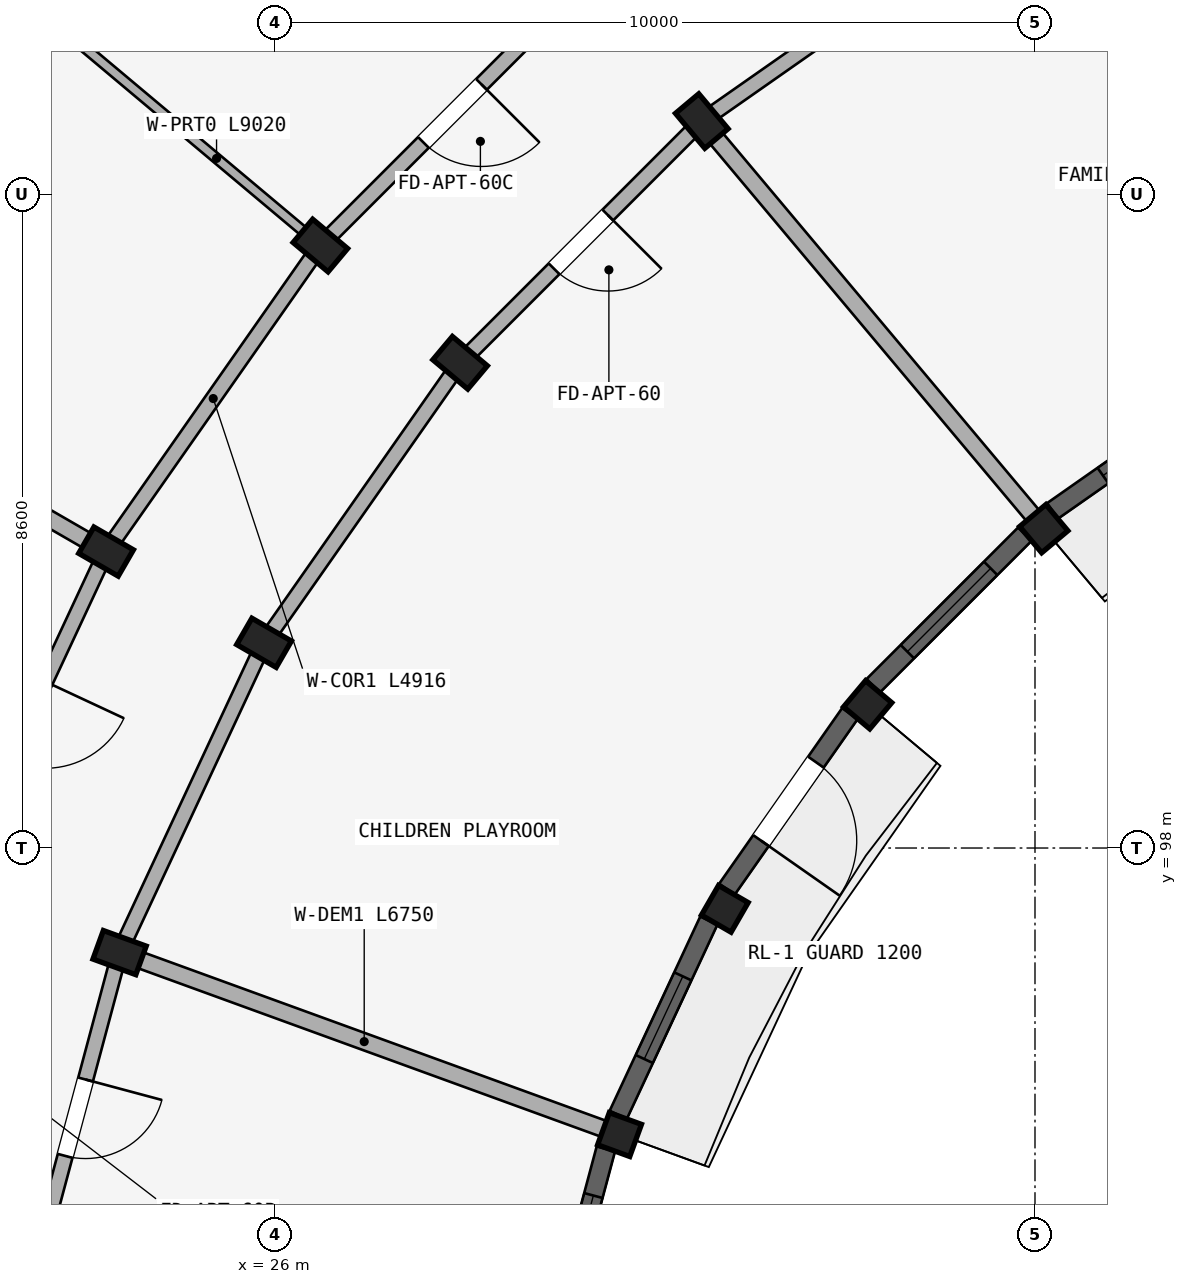
"""IFC4 building model, lengths in metres.
Left out: names, types, materials, properties, quantities, classifications, styles, units other than length and angle.
Written with IfcOpenShell. Run it as: python <this file> out.ifc"""

import sys

from ifc_helpers import new_model, si_unit, direction, frame, frame_2d, origin, origin_2d, place, context, subcontext, project, spatial, rectangle, extrude, element, fill, save


model = new_model("IFC4")
c1 = context("Model", 3, precision=1e-05, world=origin(), true_north=direction((0.0, 1.0)))
c2 = subcontext(c1, "Body", "Model", "MODEL_VIEW")
j1 = project(units=[si_unit("LENGTHUNIT", "METRE"), si_unit("PLANEANGLEUNIT", "RADIAN")], contexts=[c1])
p1 = place(None, origin())
s1 = spatial("IfcSite", under=j1, at=p1, CompositionType="ELEMENT")
p2 = place(p1, origin())
s2 = spatial("IfcBuilding", under=s1, at=p2, CompositionType="ELEMENT")
p3 = place(p2, frame((0.0, 0.0, 46.5)))
s3 = spatial("IfcBuildingStorey", under=s2, at=p3, CompositionType="ELEMENT", Elevation=46.5)
p4 = place(p3, frame((36.115, 102.202, 0.0), z_axis=(0.0, 0.0, 1.0), x_axis=(0.766044443119, 0.642787609687, 0.0)))
e1 = element("IfcColumn", 1, at=p4, inside=s3, PredefinedType="COLUMN", context=c2, shape_type="SweptSolid", body=[
    extrude(rectangle(XDim=0.45, YDim=0.45, at=origin_2d()), origin(), (0.0, 0.0, 1.0), 2.93),
])
p5 = place(p3, frame((31.616, 107.564, 0.0), z_axis=(0.0, 0.0, 1.0), x_axis=(0.766044443119, 0.642787609687, 0.0)))
e2 = element("IfcColumn", 2, at=p5, inside=s3, PredefinedType="COLUMN", context=c2, shape_type="SweptSolid", body=[
    extrude(rectangle(XDim=0.4, YDim=0.6, at=origin_2d()), origin(), (0.0, 0.0, 1.0), 2.93),
])
p6 = place(p3, frame((33.798, 99.885, 0.0), z_axis=(0.0, 0.0, 1.0), x_axis=(0.642787609687, 0.766044443119, 0.0)))
e3 = element("IfcColumn", 3, at=p6, inside=s3, PredefinedType="COLUMN", context=c2, shape_type="SweptSolid", body=[
    extrude(rectangle(XDim=0.45, YDim=0.45, at=origin_2d()), origin(), (0.0, 0.0, 1.0), 2.93),
])
for number, where, z_axis, x_axis in (
    (4, (28.436, 104.384, 0.0), (0.0, 0.0, 1.0), (0.643, 0.766, 0.0)),
    (5, (26.598, 105.927, 0.0), (0.0, 0.0, 1.0), (0.643, 0.766, 0.0)),
):
    element("IfcColumn", number, at=place(p3, frame(where, z_axis=z_axis, x_axis=x_axis)), inside=s3, PredefinedType="COLUMN", context=c2, shape_type="SweptSolid", body=[
        extrude(rectangle(XDim=0.4, YDim=0.6, at=origin_2d()), origin(), (0.0, 0.0, 1.0), 2.93),
    ])
p7 = place(p3, frame((31.919, 97.2, 0.0), z_axis=(0.0, 0.0, 1.0), x_axis=(0.5, 0.866025403784, 0.0)))
e6 = element("IfcColumn", 6, at=p7, inside=s3, PredefinedType="COLUMN", context=c2, shape_type="SweptSolid", body=[
    extrude(rectangle(XDim=0.45, YDim=0.45, at=origin_2d()), origin(), (0.0, 0.0, 1.0), 2.93),
])
for number, where, z_axis, x_axis in (
    (7, (25.856, 100.7, 0.0), (0.0, 0.0, 1.0), (0.5, 0.866, 0.0)),
    (8, (23.778, 101.9, 0.0), (0.0, 0.0, 1.0), (0.5, 0.866, 0.0)),
):
    element("IfcColumn", number, at=place(p3, frame(where, z_axis=z_axis, x_axis=x_axis)), inside=s3, PredefinedType="COLUMN", context=c2, shape_type="SweptSolid", body=[
        extrude(rectangle(XDim=0.4, YDim=0.6, at=origin_2d()), origin(), (0.0, 0.0, 1.0), 2.93),
    ])
p8 = place(p3, frame((30.534, 94.23, 0.0), z_axis=(0.0, 0.0, 1.0), x_axis=(0.342020143326, 0.939692620786, 0.0)))
e9 = element("IfcColumn", 9, at=p8, inside=s3, PredefinedType="COLUMN", context=c2, shape_type="SweptSolid", body=[
    extrude(rectangle(XDim=0.45, YDim=0.45, at=origin_2d()), origin(), (0.0, 0.0, 1.0), 2.93),
])
p9 = place(p3, frame((23.956, 96.624, 0.0), z_axis=(0.0, 0.0, 1.0), x_axis=(0.342020143326, 0.939692620786, 0.0)))
e10 = element("IfcColumn", 10, at=p9, inside=s3, PredefinedType="COLUMN", context=c2, shape_type="SweptSolid", body=[
    extrude(rectangle(XDim=0.4, YDim=0.6, at=origin_2d()), origin(), (0.0, 0.0, 1.0), 2.93),
])
p10 = place(p3, frame((35.3, 110.144, 0.0), z_axis=(0.0, 0.0, 1.0), x_axis=(-0.819155404658, -0.573571637217, 0.0)))
e11 = element("IfcWall", 11, at=p10, inside=s3, PredefinedType="STANDARD", context=c2, shape_type="SweptSolid", body=[
    extrude(rectangle(XDim=4.497, YDim=0.2, at=frame_2d((2.249, 0.0))), origin(), (0.0, 0.0, 1.0), 2.372),
])
p11 = place(p3, frame((31.616, 107.564, 0.0), z_axis=(0.0, 0.0, 1.0), x_axis=(-0.707106781187, -0.707106781187, 0.0)))
e12 = element("IfcWall", 12, at=p11, inside=s3, PredefinedType="STANDARD", context=c2, shape_type="SweptSolid", body=[
    extrude(rectangle(XDim=4.497, YDim=0.2, at=frame_2d((2.249, 0.0))), origin(), (0.0, 0.0, 1.0), 2.372),
])
p12 = place(p11, frame((1.749, 0.0, 0.0)))
e13 = element("IfcOpeningElement", 13, at=p12, cuts=e12, PredefinedType="OPENING", context=c2, shape_type="SweptSolid", body=[
    extrude(rectangle(XDim=1.0, YDim=2.15, at=frame_2d((0.5, 1.075))), frame((0.0, 0.11, 0.0), z_axis=(0.0, -1.0, 0.0), x_axis=(1.0, 0.0, 0.0)), (0.0, 0.0, 1.0), 0.22),
])
p13 = place(p3, frame((30.073, 109.402, 0.0), z_axis=(0.0, 0.0, 1.0), x_axis=(-0.707106781187, -0.707106781187, 0.0)))
e14 = element("IfcWall", 14, at=p13, inside=s3, PredefinedType="STANDARD", context=c2, shape_type="SweptSolid", body=[
    extrude(rectangle(XDim=4.916, YDim=0.2, at=frame_2d((2.458, 0.0))), origin(), (0.0, 0.0, 1.0), 2.372),
])
p14 = place(p13, frame((1.918, 0.0, 0.0)))
e15 = element("IfcOpeningElement", 15, at=p14, cuts=e14, PredefinedType="OPENING", context=c2, shape_type="SweptSolid", body=[
    extrude(rectangle(XDim=1.08, YDim=2.15, at=frame_2d((0.54, 1.075))), frame((0.0, 0.11, 0.0), z_axis=(0.0, -1.0, 0.0), x_axis=(1.0, 0.0, 0.0)), (0.0, 0.0, 1.0), 0.22),
])
p15 = place(p3, frame((28.436, 104.384, 0.0), z_axis=(0.0, 0.0, 1.0), x_axis=(-0.573571637217, -0.819155404658, 0.0)))
e16 = element("IfcWall", 16, at=p15, inside=s3, PredefinedType="STANDARD", context=c2, shape_type="SweptSolid", body=[
    extrude(rectangle(XDim=4.497, YDim=0.2, at=frame_2d((2.249, 0.0))), origin(), (0.0, 0.0, 1.0), 2.372),
])
p16 = place(p3, frame((26.598, 105.927, 0.0), z_axis=(0.0, 0.0, 1.0), x_axis=(-0.573592335331, -0.819140911474, 0.0)))
e17 = element("IfcWall", 17, at=p16, inside=s3, PredefinedType="STANDARD", context=c2, shape_type="SweptSolid", body=[
    extrude(rectangle(XDim=4.916, YDim=0.2, at=frame_2d((2.458, 0.0))), origin(), (0.0, 0.0, 1.0), 2.372),
])
p17 = place(p3, frame((25.856, 100.7, 0.0), z_axis=(0.0, 0.0, 1.0), x_axis=(-0.422617978463, -0.906307919131, 0.0)))
e18 = element("IfcWall", 18, at=p17, inside=s3, PredefinedType="STANDARD", context=c2, shape_type="SweptSolid", body=[
    extrude(rectangle(XDim=4.497, YDim=0.2, at=frame_2d((2.249, 0.0))), origin(), (0.0, 0.0, 1.0), 2.372),
])
p18 = place(p3, frame((23.778, 101.9, 0.0), z_axis=(0.0, 0.0, 1.0), x_axis=(-0.422629854778, -0.906302381024, 0.0)))
e19 = element("IfcWall", 19, at=p18, inside=s3, PredefinedType="STANDARD", context=c2, shape_type="SweptSolid", body=[
    extrude(rectangle(XDim=4.915, YDim=0.2, at=frame_2d((2.458, 0.0))), origin(), (0.0, 0.0, 1.0), 2.372),
])
p19 = place(p18, frame((1.888, 0.0, 0.0)))
e20 = element("IfcOpeningElement", 20, at=p19, cuts=e19, PredefinedType="OPENING", context=c2, shape_type="SweptSolid", body=[
    extrude(rectangle(XDim=1.14, YDim=2.15, at=frame_2d((0.57, 1.075))), frame((0.0, 0.11, 0.0), z_axis=(0.0, -1.0, 0.0), x_axis=(1.0, 0.0, 0.0)), (0.0, 0.0, 1.0), 0.22),
])
p20 = place(p3, frame((23.956, 96.624, 0.0), z_axis=(0.0, 0.0, 1.0), x_axis=(-0.258787642463, -0.965934240054, 0.0)))
e21 = element("IfcWall", 21, at=p20, inside=s3, PredefinedType="STANDARD", context=c2, shape_type="SweptSolid", body=[
    extrude(rectangle(XDim=4.497, YDim=0.2, at=frame_2d((2.249, 0.0))), origin(), (0.0, 0.0, 1.0), 2.372),
])
p21 = place(p20, frame((1.729, 0.0, 0.0)))
e22 = element("IfcOpeningElement", 22, at=p21, cuts=e21, PredefinedType="OPENING", context=c2, shape_type="SweptSolid", body=[
    extrude(rectangle(XDim=1.04, YDim=2.15, at=frame_2d((0.52, 1.075))), frame((0.0, 0.11, 0.0), z_axis=(0.0, -1.0, 0.0), x_axis=(1.0, 0.0, 0.0)), (0.0, 0.0, 1.0), 0.22),
])
p22 = place(p3, frame((35.987, 102.355, 0.0), z_axis=(0.0, 0.0, 1.0), x_axis=(-0.642784846501, 0.766046761698, 0.0)))
e23 = element("IfcWall", 23, at=p22, inside=s3, PredefinedType="STANDARD", context=c2, shape_type="SweptSolid", body=[
    extrude(rectangle(XDim=6.75, YDim=0.22, at=frame_2d((3.375, 0.0))), origin(), (0.0, 0.0, 1.0), 2.372),
])
p23 = place(p3, frame((26.521, 105.991, 0.0), z_axis=(0.0, 0.0, 1.0), x_axis=(-0.766047078847, 0.642784468535, 0.0)))
e24 = element("IfcWall", 24, at=p23, inside=s3, PredefinedType="PARTITIONING", context=c2, shape_type="SweptSolid", body=[
    extrude(rectangle(XDim=9.02, YDim=0.125, at=frame_2d((4.51, 0.0))), origin(), (0.0, 0.0, 1.0), 2.372),
])
p24 = place(p23, frame((4.45, 0.0, 0.0)))
e25 = element("IfcOpeningElement", 25, at=p24, cuts=e24, PredefinedType="OPENING", context=c2, shape_type="SweptSolid", body=[
    extrude(rectangle(XDim=0.8, YDim=2.1, at=frame_2d((0.4, 1.05))), frame((0.0, 0.073, 0.0), z_axis=(0.0, -1.0, 0.0), x_axis=(1.0, 0.0, 0.0)), (0.0, 0.0, 1.0), 0.145),
])
p25 = place(p3, frame((23.691, 101.95, 0.0), z_axis=(0.0, 0.0, 1.0), x_axis=(-0.866024222538, 0.500002045973, 0.0)))
e26 = element("IfcWall", 26, at=p25, inside=s3, PredefinedType="STANDARD", context=c2, shape_type="SweptSolid", body=[
    extrude(rectangle(XDim=9.02, YDim=0.22, at=frame_2d((4.51, 0.0))), origin(), (0.0, 0.0, 1.0), 2.372),
])
p26 = place(p3, frame((30.346, 94.298, 0.0), z_axis=(0.0, 0.0, 1.0), x_axis=(-0.939696231917, 0.342010221662, 0.0)))
e27 = element("IfcWall", 27, at=p26, inside=s3, PredefinedType="STANDARD", context=c2, shape_type="SweptSolid", body=[
    extrude(rectangle(XDim=6.75, YDim=0.22, at=frame_2d((3.375, 0.0))), origin(), (0.0, 0.0, 1.0), 2.372),
])
p27 = place(p3, frame((38.541, 104.053, 0.0), z_axis=(0.0, 0.0, 1.0), x_axis=(-0.819154644592, -0.573572722716, 0.0)))
e28 = element("IfcWall", 28, at=p27, inside=s3, PredefinedType="STANDARD", context=c2, shape_type="SweptSolid", body=[
    extrude(rectangle(XDim=2.82, YDim=0.25, at=frame_2d((1.41, 0.0))), origin(), (0.0, 0.0, 1.0), 2.472),
])
p28 = place(p27, frame((0.81, 0.0, 0.772)))
e29 = element("IfcOpeningElement", 29, at=p28, cuts=e28, PredefinedType="OPENING", context=c2, shape_type="SweptSolid", body=[
    extrude(rectangle(XDim=1.2, YDim=1.5, at=frame_2d((0.6, 0.75))), frame((0.0, 0.135, 0.0), z_axis=(0.0, -1.0, 0.0), x_axis=(1.0, 0.0, 0.0)), (0.0, 0.0, 1.0), 0.27),
])
p29 = place(p3, frame((35.866, 102.128, 0.0), z_axis=(0.0, 0.0, 1.0), x_axis=(-0.707106781187, -0.707106781187, 0.0)))
e30 = element("IfcWall", 30, at=p29, inside=s3, PredefinedType="STANDARD", context=c2, shape_type="SweptSolid", body=[
    extrude(rectangle(XDim=2.82, YDim=0.25, at=frame_2d((1.41, 0.0))), origin(), (0.0, 0.0, 1.0), 2.472),
])
p30 = place(p29, frame((0.635, 0.0, 0.672)))
e31 = element("IfcOpeningElement", 31, at=p30, cuts=e30, PredefinedType="OPENING", context=c2, shape_type="SweptSolid", body=[
    extrude(rectangle(XDim=1.55, YDim=1.6, at=frame_2d((0.775, 0.8))), frame((0.0, 0.135, 0.0), z_axis=(0.0, -1.0, 0.0), x_axis=(1.0, 0.0, 0.0)), (0.0, 0.0, 1.0), 0.27),
])
p31 = place(p3, frame((33.565, 99.769, 0.0), z_axis=(0.0, 0.0, 1.0), x_axis=(-0.573572722716, -0.819154644592, 0.0)))
e32 = element("IfcWall", 32, at=p31, inside=s3, PredefinedType="STANDARD", context=c2, shape_type="SweptSolid", body=[
    extrude(rectangle(XDim=2.82, YDim=0.25, at=frame_2d((1.41, 0.0))), origin(), (0.0, 0.0, 1.0), 2.472),
])
p32 = place(p31, frame((0.78, 0.0, 0.0)))
e33 = element("IfcOpeningElement", 33, at=p32, cuts=e32, PredefinedType="OPENING", context=c2, shape_type="SweptSolid", body=[
    extrude(rectangle(XDim=1.26, YDim=2.15, at=frame_2d((0.63, 1.075))), frame((0.0, 0.135, 0.0), z_axis=(0.0, -1.0, 0.0), x_axis=(1.0, 0.0, 0.0)), (0.0, 0.0, 1.0), 0.27),
])
p33 = place(p3, frame((31.709, 97.046, 0.0), z_axis=(0.0, 0.0, 1.0), x_axis=(-0.422667431484, -0.906284857185, 0.0)))
e34 = element("IfcWall", 34, at=p33, inside=s3, PredefinedType="STANDARD", context=c2, shape_type="SweptSolid", body=[
    extrude(rectangle(XDim=2.82, YDim=0.25, at=frame_2d((1.41, 0.0))), origin(), (0.0, 0.0, 1.0), 2.472),
])
p34 = place(p33, frame((0.81, 0.0, 0.772)))
e35 = element("IfcOpeningElement", 35, at=p34, cuts=e34, PredefinedType="OPENING", context=c2, shape_type="SweptSolid", body=[
    extrude(rectangle(XDim=1.2, YDim=1.5, at=frame_2d((0.6, 0.75))), frame((0.0, 0.135, 0.0), z_axis=(0.0, -1.0, 0.0), x_axis=(1.0, 0.0, 0.0)), (0.0, 0.0, 1.0), 0.27),
])
p35 = place(p3, frame((30.354, 94.042, 0.0), z_axis=(0.0, 0.0, 1.0), x_axis=(-0.258837049266, -0.965921001908, 0.0)))
e36 = element("IfcWall", 36, at=p35, inside=s3, PredefinedType="STANDARD", context=c2, shape_type="SweptSolid", body=[
    extrude(rectangle(XDim=2.82, YDim=0.25, at=frame_2d((1.41, 0.0))), origin(), (0.0, 0.0, 1.0), 2.472),
])
p36 = place(p35, frame((0.635, 0.0, 0.672)))
e37 = element("IfcOpeningElement", 37, at=p36, cuts=e36, PredefinedType="OPENING", context=c2, shape_type="SweptSolid", body=[
    extrude(rectangle(XDim=1.55, YDim=1.6, at=frame_2d((0.775, 0.8))), frame((0.0, 0.135, 0.0), z_axis=(0.0, -1.0, 0.0), x_axis=(1.0, 0.0, 0.0)), (0.0, 0.0, 1.0), 0.27),
])
p37 = place(p28, origin())
e38 = element("IfcWindow", 38, at=p37, inside=s3, PartitioningType="SINGLE_PANEL", PredefinedType="WINDOW", context=c2, shape_type="SweptSolid", body=[
    extrude(rectangle(XDim=1.2, YDim=1.5, at=frame_2d((0.6, 0.75))), frame((0.0, 0.03, 0.0), z_axis=(0.0, -1.0, 0.0), x_axis=(1.0, 0.0, 0.0)), (0.0, 0.0, 1.0), 0.06),
])
fill(e29, e38)
p38 = place(p30, origin())
e39 = element("IfcWindow", 39, at=p38, inside=s3, PartitioningType="DOUBLE_PANEL_VERTICAL", PredefinedType="WINDOW", context=c2, shape_type="SweptSolid", body=[
    extrude(rectangle(XDim=1.55, YDim=1.6, at=frame_2d((0.775, 0.8))), frame((0.0, 0.03, 0.0), z_axis=(0.0, -1.0, 0.0), x_axis=(1.0, 0.0, 0.0)), (0.0, 0.0, 1.0), 0.06),
])
fill(e31, e39)
p39 = place(p34, origin())
e40 = element("IfcWindow", 40, at=p39, inside=s3, PartitioningType="SINGLE_PANEL", PredefinedType="WINDOW", context=c2, shape_type="SweptSolid", body=[
    extrude(rectangle(XDim=1.2, YDim=1.5, at=frame_2d((0.6, 0.75))), frame((0.0, 0.03, 0.0), z_axis=(0.0, -1.0, 0.0), x_axis=(1.0, 0.0, 0.0)), (0.0, 0.0, 1.0), 0.06),
])
fill(e35, e40)
p40 = place(p36, origin())
e41 = element("IfcWindow", 41, at=p40, inside=s3, PartitioningType="DOUBLE_PANEL_VERTICAL", PredefinedType="WINDOW", context=c2, shape_type="SweptSolid", body=[
    extrude(rectangle(XDim=1.55, YDim=1.6, at=frame_2d((0.775, 0.8))), frame((0.0, 0.03, 0.0), z_axis=(0.0, -1.0, 0.0), x_axis=(1.0, 0.0, 0.0)), (0.0, 0.0, 1.0), 0.06),
])
fill(e37, e41)
p41 = place(p14, frame((1.08, 0.0, 0.0), z_axis=(0.0, 0.0, 1.0), x_axis=(-1.0, 0.0, 0.0)))
e42 = element("IfcDoor", 42, at=p41, inside=s3, OperationType="SINGLE_SWING_RIGHT", PredefinedType="DOOR", context=c2, shape_type="SweptSolid", body=[
    extrude(rectangle(XDim=1.08, YDim=2.15, at=frame_2d((0.54, 1.075))), frame((0.0, 0.025, 0.0), z_axis=(0.0, -1.0, 0.0), x_axis=(1.0, 0.0, 0.0)), (0.0, 0.0, 1.0), 0.05),
])
fill(e15, e42)
p42 = place(p12, frame((1.0, 0.0, 0.0), z_axis=(0.0, 0.0, 1.0), x_axis=(-1.0, 0.0, 0.0)))
e43 = element("IfcDoor", 43, at=p42, inside=s3, OperationType="SINGLE_SWING_RIGHT", PredefinedType="DOOR", context=c2, shape_type="SweptSolid", body=[
    extrude(rectangle(XDim=1.0, YDim=2.15, at=frame_2d((0.5, 1.075))), frame((0.0, 0.025, 0.0), z_axis=(0.0, -1.0, 0.0), x_axis=(1.0, 0.0, 0.0)), (0.0, 0.0, 1.0), 0.05),
])
fill(e13, e43)
p43 = place(p21, origin())
e44 = element("IfcDoor", 44, at=p43, inside=s3, OperationType="SINGLE_SWING_LEFT", PredefinedType="DOOR", context=c2, shape_type="SweptSolid", body=[
    extrude(rectangle(XDim=1.04, YDim=2.15, at=frame_2d((0.52, 1.075))), frame((0.0, 0.025, 0.0), z_axis=(0.0, -1.0, 0.0), x_axis=(1.0, 0.0, 0.0)), (0.0, 0.0, 1.0), 0.05),
])
fill(e22, e44)
p44 = place(p32, origin())
e45 = element("IfcDoor", 45, at=p44, inside=s3, OperationType="SINGLE_SWING_RIGHT", PredefinedType="DOOR", context=c2, shape_type="SweptSolid", body=[
    extrude(rectangle(XDim=1.26, YDim=2.15, at=frame_2d((0.63, 1.075))), frame((0.0, 0.025, 0.0), z_axis=(0.0, -1.0, 0.0), x_axis=(1.0, 0.0, 0.0)), (0.0, 0.0, 1.0), 0.05),
])
fill(e33, e45)
save(model, sys.argv[1])
